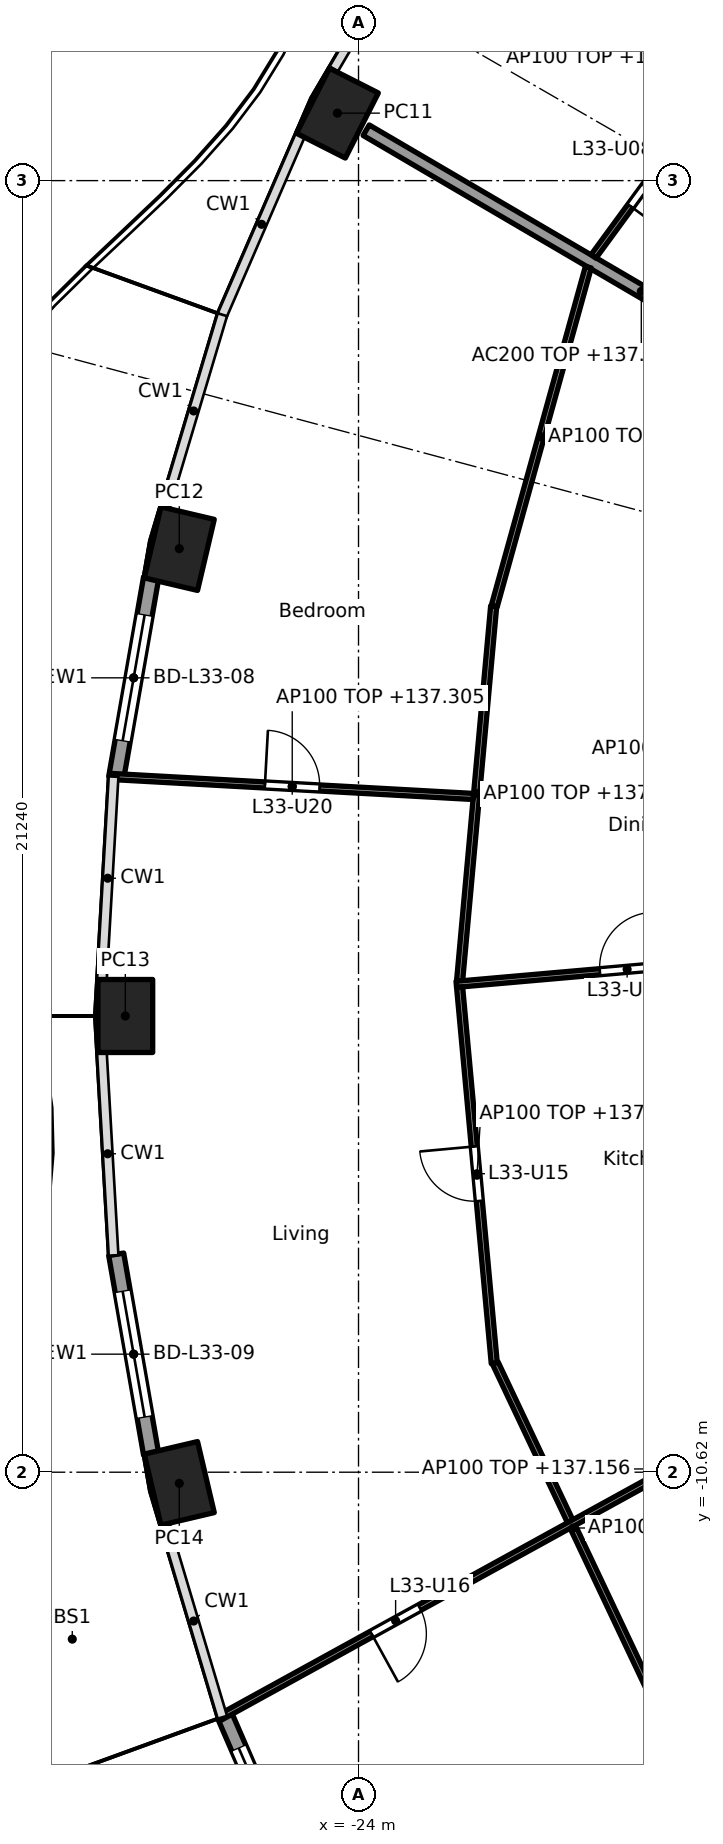
"""IFC4 building model, lengths in metres.
Left out: names, types, materials, properties, quantities, classifications, styles, units other than length and angle.
Written with IfcOpenShell. Run it as: python <this file> out.ifc"""

import sys

from ifc_helpers import new_model, si_unit, direction, frame, frame_2d, origin, origin_2d, place, context, subcontext, project, spatial, rectangle, hollow_rectangle, extrude, element, fill, save


model = new_model("IFC4")
c1 = context("Model", 3, precision=1e-05, world=origin(), true_north=direction((0.0, 1.0)))
c2 = subcontext(c1, "Body", "Model", "MODEL_VIEW")
j1 = project(units=[si_unit("LENGTHUNIT", "METRE"), si_unit("PLANEANGLEUNIT", "RADIAN")], contexts=[c1])
p1 = place(None, origin())
s1 = spatial("IfcSite", under=j1, at=p1, CompositionType="ELEMENT")
p2 = place(p1, origin())
s2 = spatial("IfcBuilding", under=s1, at=p2, CompositionType="ELEMENT")
p3 = place(p2, frame((0.0, 0.0, 134.4)))
s3 = spatial("IfcBuildingStorey", under=s2, at=p3, CompositionType="ELEMENT", Elevation=134.4)
for number, where, z_axis, x_axis in (
    (1, (-24.347, 11.73, 0.0), (0.0, 0.0, 1.0), (-0.452, -0.892, 0.0)),
    (2, (-26.948, 4.568, 0.0), (0.0, 0.0, 1.0), (-0.229, -0.973, 0.0)),
    (3, (-27.835, -3.118, 0.0), (0.0, 0.0, 1.0), (0.0, -1.0, 0.0)),
    (4, (-26.948, -10.803, 0.0), (0.0, 0.0, 1.0), (0.229, -0.973, 0.0)),
):
    element("IfcColumn", number, at=place(p3, frame(where, z_axis=z_axis, x_axis=x_axis)), inside=s3, PredefinedType="COLUMN", context=c2, shape_type="SweptSolid", body=[
        extrude(hollow_rectangle(XDim=1.2, YDim=0.9, WallThickness=0.04, at=origin_2d()), origin(), (0.0, 0.0, 1.0), 3.7),
    ])
p4 = place(p3, frame((-27.985, 0.802, 0.0), z_axis=(0.0, 0.0, 1.0), x_axis=(0.172163521006, 0.985068384446, 0.0)))
e5 = element("IfcWall", 5, at=p4, inside=s3, PredefinedType="SOLIDWALL", context=c2, shape_type="SweptSolid", body=[
    extrude(rectangle(XDim=3.333, YDim=0.25, at=frame_2d((1.666, 0.0))), origin(), (0.0, 0.0, 1.0), 3.44),
])
p5 = place(p4, frame((0.616, 0.0, 0.0)))
e6 = element("IfcOpeningElement", 6, at=p5, cuts=e5, PredefinedType="OPENING", context=c2, shape_type="SweptSolid", body=[
    extrude(rectangle(XDim=2.1, YDim=2.4, at=frame_2d((1.05, 1.2))), frame((0.0, 0.135, 0.0), z_axis=(0.0, -1.0, 0.0), x_axis=(1.0, 0.0, 0.0)), (0.0, 0.0, 1.0), 0.27),
])
p6 = place(p3, frame((-27.411, -10.32, 0.0), z_axis=(0.0, 0.0, 1.0), x_axis=(-0.172163521006, 0.985068384446, 0.0)))
e7 = element("IfcWall", 7, at=p6, inside=s3, PredefinedType="SOLIDWALL", context=c2, shape_type="SweptSolid", body=[
    extrude(rectangle(XDim=3.333, YDim=0.25, at=frame_2d((1.666, 0.0))), origin(), (0.0, 0.0, 1.0), 3.44),
])
p7 = place(p6, frame((0.616, 0.0, 0.0)))
e8 = element("IfcOpeningElement", 8, at=p7, cuts=e7, PredefinedType="OPENING", context=c2, shape_type="SweptSolid", body=[
    extrude(rectangle(XDim=2.1, YDim=2.4, at=frame_2d((1.05, 1.2))), frame((0.0, 0.135, 0.0), z_axis=(0.0, -1.0, 0.0), x_axis=(1.0, 0.0, 0.0)), (0.0, 0.0, 1.0), 0.27),
])
p8 = place(p3, frame((-24.904, -17.615, 0.0), z_axis=(0.0, 0.0, 1.0), x_axis=(-0.397638954585, 0.917541967321, 0.0)))
e9 = element("IfcWall", 9, at=p8, inside=s3, PredefinedType="SOLIDWALL", context=c2, shape_type="SweptSolid", body=[
    extrude(rectangle(XDim=3.261, YDim=0.25, at=frame_2d((1.63, 0.0))), origin(), (0.0, 0.0, 1.0), 3.44),
])
p9 = place(p8, frame((0.58, 0.0, 0.0)))
e10 = element("IfcOpeningElement", 10, at=p9, cuts=e9, PredefinedType="OPENING", context=c2, shape_type="SweptSolid", body=[
    extrude(rectangle(XDim=2.1, YDim=2.4, at=frame_2d((1.05, 1.2))), frame((0.0, 0.135, 0.0), z_axis=(0.0, -1.0, 0.0), x_axis=(1.0, 0.0, 0.0)), (0.0, 0.0, 1.0), 0.27),
])
p10 = place(p3, frame((-14.825, 6.148, 0.0), z_axis=(0.0, 0.0, 1.0), x_axis=(-0.862852031662, 0.505456597006, 0.0)))
e11 = element("IfcWall", 11, at=p10, inside=s3, PredefinedType="PARTITIONING", context=c2, shape_type="SweptSolid", body=[
    extrude(rectangle(XDim=10.487, YDim=0.2, at=frame_2d((5.244, 0.0))), origin(), (0.0, 0.0, 1.0), 2.828),
])
p11 = place(p3, frame((-16.621, 14.174, 0.0), z_axis=(0.0, 0.0, 1.0), x_axis=(-0.590674917338, -0.806909624449, 0.0)))
e12 = element("IfcWall", 12, at=p11, inside=s3, PredefinedType="PARTITIONING", context=c2, shape_type="SweptSolid", body=[
    extrude(rectangle(XDim=5.949, YDim=0.1, at=frame_2d((2.975, 0.0))), origin(), (0.0, 0.0, 1.0), 2.828),
])
p12 = place(p11, frame((4.024, 0.0, 0.0)))
e13 = element("IfcOpeningElement", 13, at=p12, cuts=e12, PredefinedType="OPENING", context=c2, shape_type="SweptSolid", body=[
    extrude(rectangle(XDim=0.9, YDim=2.1, at=frame_2d((0.45, 1.05))), frame((0.0, 0.06, 0.0), z_axis=(0.0, -1.0, 0.0), x_axis=(1.0, 0.0, 0.0)), (0.0, 0.0, 1.0), 0.12),
])
p13 = place(p3, frame((-20.221, 9.197, 0.0), z_axis=(0.0, 0.0, 1.0), x_axis=(-0.267398009191, -0.963586168789, 0.0)))
e14 = element("IfcWall", 14, at=p13, inside=s3, PredefinedType="PARTITIONING", context=c2, shape_type="SweptSolid", body=[
    extrude(rectangle(XDim=5.788, YDim=0.1, at=frame_2d((2.894, 0.0))), origin(), (0.0, 0.0, 1.0), 2.828),
])
p14 = place(p3, frame((-21.777, 3.621, 0.0), z_axis=(0.0, 0.0, 1.0), x_axis=(-0.090606877484, -0.995886737412, 0.0)))
e15 = element("IfcWall", 15, at=p14, inside=s3, PredefinedType="PARTITIONING", context=c2, shape_type="SweptSolid", body=[
    extrude(rectangle(XDim=6.189, YDim=0.1, at=frame_2d((3.095, 0.0))), origin(), (0.0, 0.0, 1.0), 2.828),
])
p15 = place(p3, frame((-22.112, 0.492, 0.0), z_axis=(0.0, 0.0, 1.0), x_axis=(-0.998479185151, 0.055129999278, 0.0)))
e16 = element("IfcWall", 16, at=p15, inside=s3, PredefinedType="PARTITIONING", context=c2, shape_type="SweptSolid", body=[
    extrude(rectangle(XDim=5.965, YDim=0.1, at=frame_2d((2.982, 0.0))), origin(), (0.0, 0.0, 1.0), 2.905),
])
p16 = place(p15, frame((2.533, 0.0, 0.0)))
e17 = element("IfcOpeningElement", 17, at=p16, cuts=e16, PredefinedType="OPENING", context=c2, shape_type="SweptSolid", body=[
    extrude(rectangle(XDim=0.9, YDim=2.1, at=frame_2d((0.45, 1.05))), frame((0.0, 0.06, 0.0), z_axis=(0.0, -1.0, 0.0), x_axis=(1.0, 0.0, 0.0)), (0.0, 0.0, 1.0), 0.12),
])
p17 = place(p3, frame((-12.664, -1.744, 0.0), z_axis=(0.0, 0.0, 1.0), x_axis=(-0.99617728169, -0.087354584571, 0.0)))
e18 = element("IfcWall", 18, at=p17, inside=s3, PredefinedType="PARTITIONING", context=c2, shape_type="SweptSolid", body=[
    extrude(rectangle(XDim=9.765, YDim=0.1, at=frame_2d((4.883, 0.0))), origin(), (0.0, 0.0, 1.0), 2.756),
])
p18 = place(p17, frame((6.495, 0.0, 0.0)))
e19 = element("IfcOpeningElement", 19, at=p18, cuts=e18, PredefinedType="OPENING", context=c2, shape_type="SweptSolid", body=[
    extrude(rectangle(XDim=0.9, YDim=2.1, at=frame_2d((0.45, 1.05))), frame((0.0, 0.06, 0.0), z_axis=(0.0, -1.0, 0.0), x_axis=(1.0, 0.0, 0.0)), (0.0, 0.0, 1.0), 0.12),
])
p19 = place(p3, frame((-22.338, -2.642, 0.0), z_axis=(0.0, 0.0, 1.0), x_axis=(0.091768304523, -0.995780386574, 0.0)))
e20 = element("IfcWall", 20, at=p19, inside=s3, PredefinedType="PARTITIONING", context=c2, shape_type="SweptSolid", body=[
    extrude(rectangle(XDim=6.215, YDim=0.1, at=frame_2d((3.107, 0.0))), origin(), (0.0, 0.0, 1.0), 2.828),
])
p20 = place(p19, frame((2.632, 0.0, 0.0)))
e21 = element("IfcOpeningElement", 21, at=p20, cuts=e20, PredefinedType="OPENING", context=c2, shape_type="SweptSolid", body=[
    extrude(rectangle(XDim=0.9, YDim=2.1, at=frame_2d((0.45, 1.05))), frame((0.0, 0.06, 0.0), z_axis=(0.0, -1.0, 0.0), x_axis=(1.0, 0.0, 0.0)), (0.0, 0.0, 1.0), 0.12),
])
p21 = place(p3, frame((-21.75, -8.826, 0.0), z_axis=(0.0, 0.0, 1.0), x_axis=(0.427736419988, -0.903903509793, 0.0)))
e22 = element("IfcWall", 22, at=p21, inside=s3, PredefinedType="PARTITIONING", context=c2, shape_type="SweptSolid", body=[
    extrude(rectangle(XDim=5.999, YDim=0.1, at=frame_2d((3.0, 0.0))), origin(), (0.0, 0.0, 1.0), 2.828),
])
p22 = place(p3, frame((-11.426, -6.479, 0.0), z_axis=(0.0, 0.0, 1.0), x_axis=(-0.876110392495, -0.482110547657, 0.0)))
e23 = element("IfcWall", 23, at=p22, inside=s3, PredefinedType="PARTITIONING", context=c2, shape_type="SweptSolid", body=[
    extrude(rectangle(XDim=16.955, YDim=0.1, at=frame_2d((8.478, 0.0))), origin(), (0.0, 0.0, 1.0), 2.756),
])
p23 = place(p22, frame((0.35, 0.0, 0.0)))
e24 = element("IfcOpeningElement", 24, at=p23, cuts=e23, PredefinedType="OPENING", context=c2, shape_type="SweptSolid", body=[
    extrude(rectangle(XDim=0.9, YDim=2.1, at=frame_2d((0.45, 1.05))), frame((0.0, 0.06, 0.0), z_axis=(0.0, -1.0, 0.0), x_axis=(1.0, 0.0, 0.0)), (0.0, 0.0, 1.0), 0.12),
])
p24 = place(p22, frame((6.957, 0.0, 0.0)))
e25 = element("IfcOpeningElement", 25, at=p24, cuts=e23, PredefinedType="OPENING", context=c2, shape_type="SweptSolid", body=[
    extrude(rectangle(XDim=0.9, YDim=2.1, at=frame_2d((0.45, 1.05))), frame((0.0, 0.06, 0.0), z_axis=(0.0, -1.0, 0.0), x_axis=(1.0, 0.0, 0.0)), (0.0, 0.0, 1.0), 0.12),
])
p25 = place(p22, frame((13.206, 0.0, 0.0)))
e26 = element("IfcOpeningElement", 26, at=p25, cuts=e23, PredefinedType="OPENING", context=c2, shape_type="SweptSolid", body=[
    extrude(rectangle(XDim=0.9, YDim=2.1, at=frame_2d((0.45, 1.05))), frame((0.0, 0.06, 0.0), z_axis=(0.0, -1.0, 0.0), x_axis=(1.0, 0.0, 0.0)), (0.0, 0.0, 1.0), 0.12),
])
p26 = place(p3, frame((-11.109, -13.951, 0.0), z_axis=(0.0, 0.0, 1.0), x_axis=(-0.668488676691, -0.743722319913, 0.0)))
e27 = element("IfcWall", 27, at=p26, inside=s3, PredefinedType="PARTITIONING", context=c2, shape_type="SweptSolid", body=[
    extrude(rectangle(XDim=13.094, YDim=0.1, at=frame_2d((6.547, 0.0))), origin(), (0.0, 0.0, 1.0), 2.828),
])
p27 = place(p26, frame((9.5, 0.0, 0.0)))
e28 = element("IfcOpeningElement", 28, at=p27, cuts=e27, PredefinedType="OPENING", context=c2, shape_type="SweptSolid", body=[
    extrude(rectangle(XDim=0.9, YDim=2.1, at=frame_2d((0.45, 1.05))), frame((0.0, 0.06, 0.0), z_axis=(0.0, -1.0, 0.0), x_axis=(1.0, 0.0, 0.0)), (0.0, 0.0, 1.0), 0.12),
])
p28 = place(p5, origin())
e29 = element("IfcDoor", 29, at=p28, inside=s3, OperationType="SLIDING_TO_LEFT", PredefinedType="DOOR", context=c2, shape_type="SweptSolid", body=[
    extrude(rectangle(XDim=2.1, YDim=2.4, at=frame_2d((1.05, 1.2))), frame((0.0, 0.025, 0.0), z_axis=(0.0, -1.0, 0.0), x_axis=(1.0, 0.0, 0.0)), (0.0, 0.0, 1.0), 0.05),
])
fill(e6, e29)
p29 = place(p7, origin())
e30 = element("IfcDoor", 30, at=p29, inside=s3, OperationType="SLIDING_TO_LEFT", PredefinedType="DOOR", context=c2, shape_type="SweptSolid", body=[
    extrude(rectangle(XDim=2.1, YDim=2.4, at=frame_2d((1.05, 1.2))), frame((0.0, 0.025, 0.0), z_axis=(0.0, -1.0, 0.0), x_axis=(1.0, 0.0, 0.0)), (0.0, 0.0, 1.0), 0.05),
])
fill(e8, e30)
p30 = place(p9, origin())
e31 = element("IfcDoor", 31, at=p30, inside=s3, OperationType="SLIDING_TO_LEFT", PredefinedType="DOOR", context=c2, shape_type="SweptSolid", body=[
    extrude(rectangle(XDim=2.1, YDim=2.4, at=frame_2d((1.05, 1.2))), frame((0.0, 0.025, 0.0), z_axis=(0.0, -1.0, 0.0), x_axis=(1.0, 0.0, 0.0)), (0.0, 0.0, 1.0), 0.05),
])
fill(e10, e31)
p31 = place(p12, origin())
e32 = element("IfcDoor", 32, at=p31, inside=s3, OperationType="SINGLE_SWING_RIGHT", PredefinedType="DOOR", context=c2, shape_type="SweptSolid", body=[
    extrude(rectangle(XDim=0.9, YDim=2.1, at=frame_2d((0.45, 1.05))), frame((0.0, 0.025, 0.0), z_axis=(0.0, -1.0, 0.0), x_axis=(1.0, 0.0, 0.0)), (0.0, 0.0, 1.0), 0.05),
])
fill(e13, e32)
p32 = place(p20, frame((0.9, 0.0, 0.0), x_axis=(-1.0, 0.0, 0.0)))
e33 = element("IfcDoor", 33, at=p32, inside=s3, OperationType="SINGLE_SWING_RIGHT", PredefinedType="DOOR", context=c2, shape_type="SweptSolid", body=[
    extrude(rectangle(XDim=0.9, YDim=2.1, at=frame_2d((0.45, 1.05))), frame((0.0, 0.025, 0.0), z_axis=(0.0, -1.0, 0.0), x_axis=(1.0, 0.0, 0.0)), (0.0, 0.0, 1.0), 0.05),
])
fill(e21, e33)
p33 = place(p25, origin())
e34 = element("IfcDoor", 34, at=p33, inside=s3, OperationType="SINGLE_SWING_RIGHT", PredefinedType="DOOR", context=c2, shape_type="SweptSolid", body=[
    extrude(rectangle(XDim=0.9, YDim=2.1, at=frame_2d((0.45, 1.05))), frame((0.0, 0.025, 0.0), z_axis=(0.0, -1.0, 0.0), x_axis=(1.0, 0.0, 0.0)), (0.0, 0.0, 1.0), 0.05),
])
fill(e26, e34)
p34 = place(p18, frame((0.9, 0.0, 0.0), x_axis=(-1.0, 0.0, 0.0)))
e35 = element("IfcDoor", 35, at=p34, inside=s3, OperationType="SINGLE_SWING_RIGHT", PredefinedType="DOOR", context=c2, shape_type="SweptSolid", body=[
    extrude(rectangle(XDim=0.9, YDim=2.1, at=frame_2d((0.45, 1.05))), frame((0.0, 0.025, 0.0), z_axis=(0.0, -1.0, 0.0), x_axis=(1.0, 0.0, 0.0)), (0.0, 0.0, 1.0), 0.05),
])
fill(e19, e35)
p35 = place(p16, frame((0.9, 0.0, 0.0), x_axis=(-1.0, 0.0, 0.0)))
e36 = element("IfcDoor", 36, at=p35, inside=s3, OperationType="SINGLE_SWING_LEFT", PredefinedType="DOOR", context=c2, shape_type="SweptSolid", body=[
    extrude(rectangle(XDim=0.9, YDim=2.1, at=frame_2d((0.45, 1.05))), frame((0.0, 0.025, 0.0), z_axis=(0.0, -1.0, 0.0), x_axis=(1.0, 0.0, 0.0)), (0.0, 0.0, 1.0), 0.05),
])
fill(e17, e36)
save(model, sys.argv[1])
